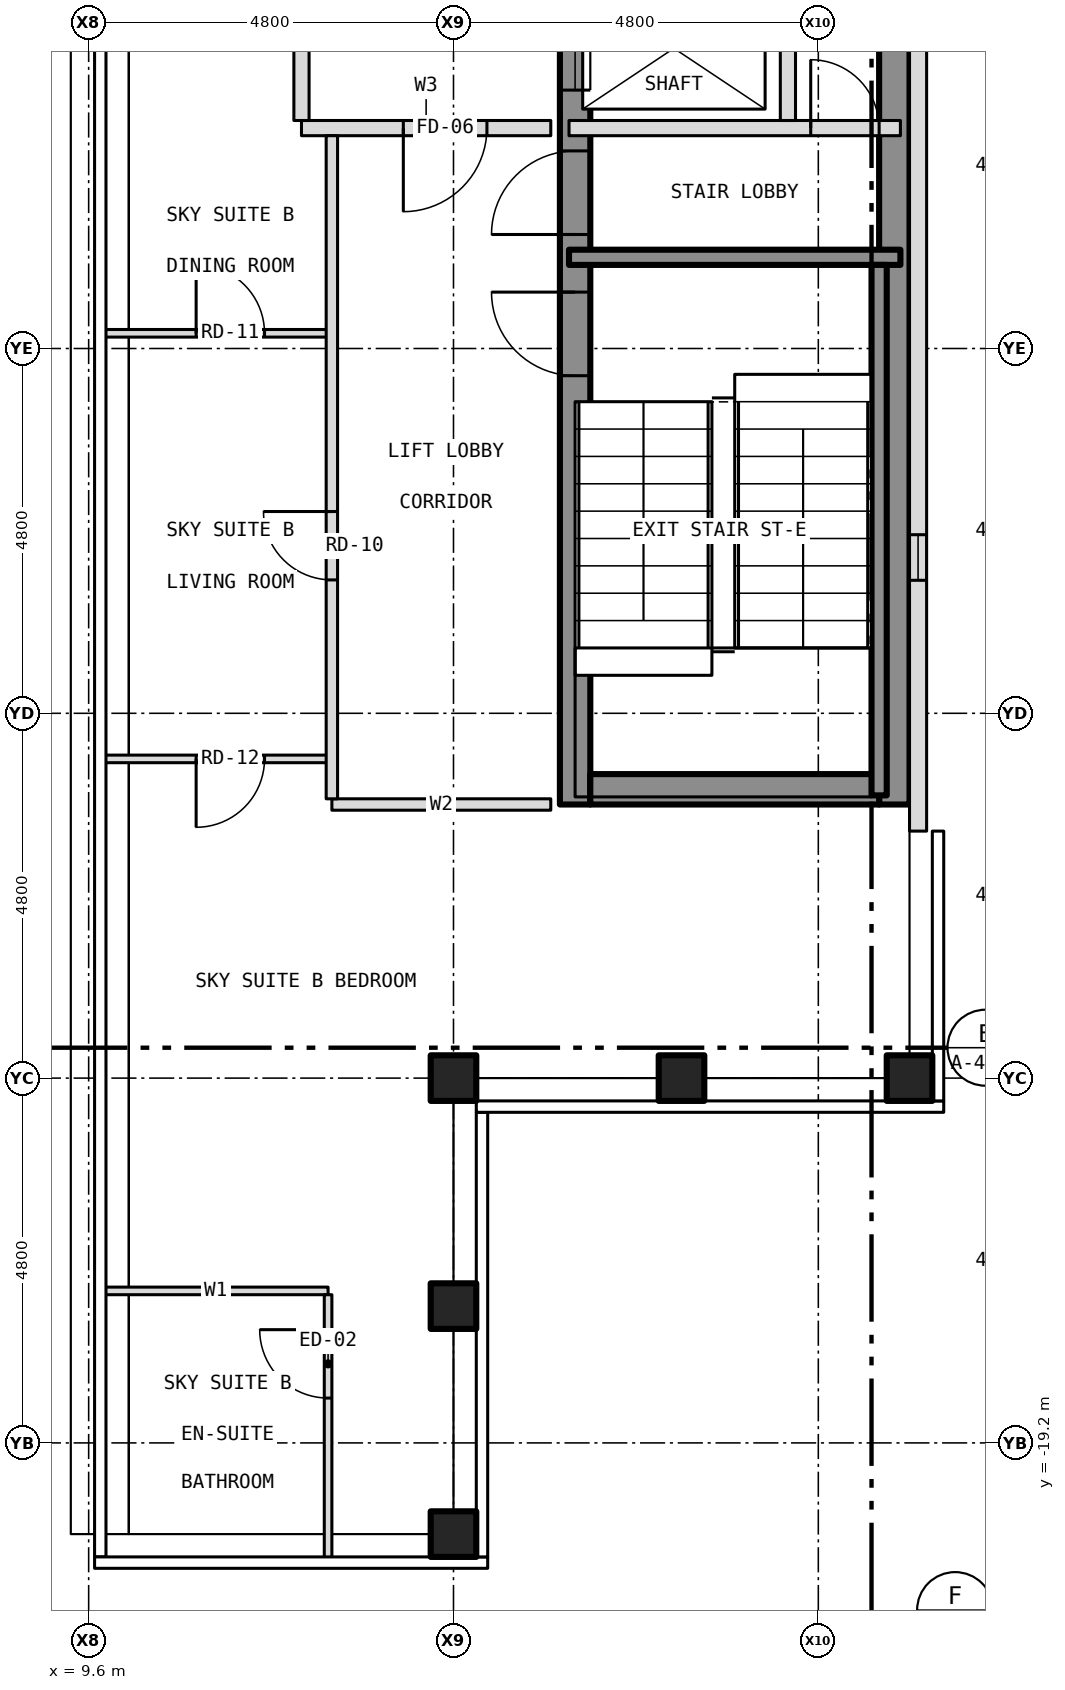
"""IFC4 building model, lengths in metres.
Left out: names, types, materials, properties, quantities, classifications, styles, units other than length and angle.
Written with IfcOpenShell. Run it as: python <this file> out.ifc"""

import sys

from ifc_helpers import new_model, si_unit, direction, frame, frame_2d, origin, origin_2d, place, context, subcontext, project, spatial, rectangle, hollow_rectangle, extrude, element, fill, save


model = new_model("IFC4")
c1 = context("Model", 3, precision=1e-05, world=origin(), true_north=direction((0.0, 1.0)))
c2 = subcontext(c1, "Body", "Model", "MODEL_VIEW")
j1 = project(units=[si_unit("LENGTHUNIT", "METRE"), si_unit("PLANEANGLEUNIT", "RADIAN")], contexts=[c1])
p1 = place(None, origin())
s1 = spatial("IfcSite", under=j1, at=p1, CompositionType="ELEMENT")
p2 = place(p1, origin())
s2 = spatial("IfcBuilding", under=s1, at=p2, CompositionType="ELEMENT")
p3 = place(p2, frame((0.0, 0.0, 279.5)))
s3 = spatial("IfcBuildingStorey", under=s2, at=p3, CompositionType="ELEMENT", Elevation=279.5)
for number, where, z_axis, x_axis in (
    (1, (14.4, -20.4, -0.15), (0.0, 0.0, 1.0), (1.0, 0.0, 0.0)),
    (2, (20.4, -14.4, -0.15), (0.0, 0.0, 1.0), (1.0, 0.0, 0.0)),
    (3, (14.4, -14.4, -0.15), (0.0, 0.0, 1.0), (1.0, 0.0, 0.0)),
    (4, (14.4, -17.4, -0.15), (0.0, 0.0, 1.0), (1.0, 0.0, 0.0)),
    (5, (17.4, -14.4, -0.15), (0.0, 0.0, 1.0), (1.0, 0.0, 0.0)),
):
    element("IfcColumn", number, at=place(p3, frame(where, z_axis=z_axis, x_axis=x_axis)), inside=s3, PredefinedType="COLUMN", context=c2, shape_type="SweptSolid", body=[
        extrude(hollow_rectangle(XDim=0.6, YDim=0.6, WallThickness=0.03, at=origin_2d()), origin(), (0.0, 0.0, 1.0), 3.5),
    ])
p4 = place(p3, frame((16.0, -10.8, 0.0), z_axis=(0.0, 0.0, 1.0), x_axis=(0.0, 1.0, 0.0)))
e6 = element("IfcWall", 6, at=p4, inside=s3, PredefinedType="SHEAR", context=c2, shape_type="SweptSolid", body=[
    extrude(rectangle(XDim=21.6, YDim=0.4, at=frame_2d((10.8, 0.0))), origin(), (0.0, 0.0, 1.0), 3.25),
])
p5 = place(p4, frame((9.4, 0.0, 0.0)))
e7 = element("IfcOpeningElement", 7, at=p5, cuts=e6, PredefinedType="OPENING", context=c2, shape_type="SweptSolid", body=[
    extrude(rectangle(XDim=1.1, YDim=2.1, at=frame_2d((0.55, 1.05))), frame((0.0, 0.212, 0.0), z_axis=(0.0, -1.0, 0.0), x_axis=(1.0, 0.0, 0.0)), (0.0, 0.0, 1.0), 0.424),
])
p6 = place(p4, frame((11.5, 0.0, 0.0)))
e8 = element("IfcOpeningElement", 8, at=p6, cuts=e6, PredefinedType="OPENING", context=c2, shape_type="SweptSolid", body=[
    extrude(rectangle(XDim=1.1, YDim=2.1, at=frame_2d((0.55, 1.05))), frame((0.0, 0.212, 0.0), z_axis=(0.0, -1.0, 0.0), x_axis=(1.0, 0.0, 0.0)), (0.0, 0.0, 1.0), 0.424),
])
p7 = place(p4, frame((13.6, 0.0, 0.0)))
e9 = element("IfcOpeningElement", 9, at=p7, cuts=e6, PredefinedType="OPENING", context=c2, shape_type="SweptSolid", body=[
    extrude(rectangle(XDim=1.1, YDim=2.1, at=frame_2d((0.55, 1.05))), frame((0.0, 0.212, 0.0), z_axis=(0.0, -1.0, 0.0), x_axis=(1.0, 0.0, 0.0)), (0.0, 0.0, 1.0), 0.424),
])
p8 = place(p4, frame((15.7, 0.0, 0.0)))
e10 = element("IfcOpeningElement", 10, at=p8, cuts=e6, PredefinedType="OPENING", context=c2, shape_type="SweptSolid", body=[
    extrude(rectangle(XDim=1.1, YDim=2.1, at=frame_2d((0.55, 1.05))), frame((0.0, 0.212, 0.0), z_axis=(0.0, -1.0, 0.0), x_axis=(1.0, 0.0, 0.0)), (0.0, 0.0, 1.0), 0.424),
])
p9 = place(p4, frame((17.8, 0.0, 0.0)))
e11 = element("IfcOpeningElement", 11, at=p9, cuts=e6, PredefinedType="OPENING", context=c2, shape_type="SweptSolid", body=[
    extrude(rectangle(XDim=1.1, YDim=2.1, at=frame_2d((0.55, 1.05))), frame((0.0, 0.212, 0.0), z_axis=(0.0, -1.0, 0.0), x_axis=(1.0, 0.0, 0.0)), (0.0, 0.0, 1.0), 0.424),
])
p10 = place(p4, frame((5.642, 0.0, 0.0)))
e12 = element("IfcOpeningElement", 12, at=p10, cuts=e6, PredefinedType="OPENING", context=c2, shape_type="SweptSolid", body=[
    extrude(rectangle(XDim=1.1, YDim=2.1, at=frame_2d((0.55, 1.05))), frame((0.0, 0.212, 0.0), z_axis=(0.0, -1.0, 0.0), x_axis=(1.0, 0.0, 0.0)), (0.0, 0.0, 1.0), 0.424),
])
p11 = place(p4, frame((7.5, 0.0, 0.0)))
e13 = element("IfcOpeningElement", 13, at=p11, cuts=e6, PredefinedType="OPENING", context=c2, shape_type="SweptSolid", body=[
    extrude(rectangle(XDim=1.1, YDim=2.1, at=frame_2d((0.55, 1.05))), frame((0.0, 0.212, 0.0), z_axis=(0.0, -1.0, 0.0), x_axis=(1.0, 0.0, 0.0)), (0.0, 0.0, 1.0), 0.424),
])
p12 = place(p4, frame((20.0, 0.0, 0.0)))
e14 = element("IfcOpeningElement", 14, at=p12, cuts=e6, PredefinedType="OPENING", context=c2, shape_type="SweptSolid", body=[
    extrude(rectangle(XDim=0.9, YDim=2.1, at=frame_2d((0.45, 1.05))), frame((0.0, 0.212, 0.0), z_axis=(0.0, -1.0, 0.0), x_axis=(1.0, 0.0, 0.0)), (0.0, 0.0, 1.0), 0.424),
])
p13 = place(p3, frame((20.2, -10.8, 0.0), z_axis=(0.0, 0.0, 1.0), x_axis=(0.0, 1.0, 0.0)))
e15 = element("IfcWall", 15, at=p13, inside=s3, PredefinedType="SHEAR", context=c2, shape_type="SweptSolid", body=[
    extrude(rectangle(XDim=21.6, YDim=0.4, at=frame_2d((10.8, 0.0))), origin(), (0.0, 0.0, 1.0), 3.25),
])
p14 = place(p3, frame((16.2, -10.6, 0.0), z_axis=(0.0, 0.0, 1.0), x_axis=(1.0, 0.0, 0.0)))
e16 = element("IfcWall", 16, at=p14, inside=s3, PredefinedType="SHEAR", context=c2, shape_type="SweptSolid", body=[
    extrude(rectangle(XDim=3.8, YDim=0.4, at=frame_2d((1.9, 0.0))), origin(), (0.0, 0.0, 1.0), 3.25),
])
p15 = place(p3, frame((20.512, -11.15, 0.0), z_axis=(0.0, 0.0, 1.0), x_axis=(0.0, 1.0, 0.0)))
e17 = element("IfcWall", 17, at=p15, inside=s3, PredefinedType="SOLIDWALL", context=c2, shape_type="SweptSolid", body=[
    extrude(rectangle(XDim=22.3, YDim=0.225, at=frame_2d((11.15, 0.0))), origin(), (0.0, 0.0, 1.0), 3.5),
])
p16 = place(p15, frame((3.3, 0.0, 1.0)))
e18 = element("IfcOpeningElement", 18, at=p16, cuts=e17, PredefinedType="OPENING", context=c2, shape_type="SweptSolid", body=[
    extrude(rectangle(XDim=0.6, YDim=1.5, at=frame_2d((0.3, 0.75))), frame((0.0, 0.125, 0.0), z_axis=(0.0, -1.0, 0.0), x_axis=(1.0, 0.0, 0.0)), (0.0, 0.0, 1.0), 0.249),
])
p17 = place(p3, frame((9.798, -17.2, 0.0), z_axis=(0.0, 0.0, 1.0), x_axis=(1.0, 0.0, 0.0)))
e19 = element("IfcWall", 19, at=p17, inside=s3, PredefinedType="PARTITIONING", context=c2, shape_type="SweptSolid", body=[
    extrude(rectangle(XDim=2.952, YDim=0.1, at=frame_2d((1.476, 0.0))), origin(), (0.0, 0.0, 1.0), 3.35),
])
p18 = place(p3, frame((12.8, -10.8, 0.0), z_axis=(0.0, 0.0, 1.0), x_axis=(1.0, 0.0, 0.0)))
e20 = element("IfcWall", 20, at=p18, inside=s3, PredefinedType="PARTITIONING", context=c2, shape_type="SweptSolid", body=[
    extrude(rectangle(XDim=2.88, YDim=0.15, at=frame_2d((1.44, 0.0))), origin(), (0.0, 0.0, 1.0), 3.35),
])
p19 = place(p3, frame((9.798, -10.2, 0.0), z_axis=(0.0, 0.0, 1.0), x_axis=(1.0, 0.0, 0.0)))
e21 = element("IfcWall", 21, at=p19, inside=s3, PredefinedType="PARTITIONING", context=c2, shape_type="SweptSolid", body=[
    extrude(rectangle(XDim=3.002, YDim=0.1, at=frame_2d((1.501, 0.0))), origin(), (0.0, 0.0, 1.0), 3.35),
])
p20 = place(p19, frame((1.216, 0.0, 0.0)))
e22 = element("IfcOpeningElement", 22, at=p20, cuts=e21, PredefinedType="OPENING", context=c2, shape_type="SweptSolid", body=[
    extrude(rectangle(XDim=0.9, YDim=2.1, at=frame_2d((0.45, 1.05))), frame((0.0, 0.062, 0.0), z_axis=(0.0, -1.0, 0.0), x_axis=(1.0, 0.0, 0.0)), (0.0, 0.0, 1.0), 0.124),
])
p21 = place(p3, frame((9.798, -4.6, 0.0), z_axis=(0.0, 0.0, 1.0), x_axis=(1.0, 0.0, 0.0)))
e23 = element("IfcWall", 23, at=p21, inside=s3, PredefinedType="PARTITIONING", context=c2, shape_type="SweptSolid", body=[
    extrude(rectangle(XDim=3.002, YDim=0.1, at=frame_2d((1.501, 0.0))), origin(), (0.0, 0.0, 1.0), 3.35),
])
p22 = place(p21, frame((1.216, 0.0, 0.0)))
e24 = element("IfcOpeningElement", 24, at=p22, cuts=e23, PredefinedType="OPENING", context=c2, shape_type="SweptSolid", body=[
    extrude(rectangle(XDim=0.9, YDim=2.1, at=frame_2d((0.45, 1.05))), frame((0.0, 0.062, 0.0), z_axis=(0.0, -1.0, 0.0), x_axis=(1.0, 0.0, 0.0)), (0.0, 0.0, 1.0), 0.124),
])
p23 = place(p3, frame((15.92, -3.6, 0.0), z_axis=(0.0, 0.0, 1.0), x_axis=(1.0, 0.0, 0.0)))
e25 = element("IfcWall", 25, at=p23, inside=s3, PredefinedType="SHEAR", context=c2, shape_type="SweptSolid", body=[
    extrude(rectangle(XDim=4.36, YDim=0.2, at=frame_2d((2.18, 0.0))), origin(), (0.0, 0.0, 1.0), 3.25),
])
p24 = place(p3, frame((12.4, -1.9, 0.0), z_axis=(0.0, 0.0, 1.0), x_axis=(1.0, 0.0, 0.0)))
e26 = element("IfcWall", 26, at=p24, inside=s3, PredefinedType="PARTITIONING", context=c2, shape_type="SweptSolid", body=[
    extrude(rectangle(XDim=3.28, YDim=0.2, at=frame_2d((1.64, 0.0))), origin(), (0.0, 0.0, 1.0), 3.35),
])
p25 = place(p24, frame((1.34, 0.0, 0.0)))
e27 = element("IfcOpeningElement", 27, at=p25, cuts=e26, PredefinedType="OPENING", context=c2, shape_type="SweptSolid", body=[
    extrude(rectangle(XDim=1.1, YDim=2.1, at=frame_2d((0.55, 1.05))), frame((0.0, 0.112, 0.0), z_axis=(0.0, -1.0, 0.0), x_axis=(1.0, 0.0, 0.0)), (0.0, 0.0, 1.0), 0.224),
])
p26 = place(p3, frame((15.92, -1.9, 0.0), z_axis=(0.0, 0.0, 1.0), x_axis=(1.0, 0.0, 0.0)))
e28 = element("IfcWall", 28, at=p26, inside=s3, PredefinedType="PARTITIONING", context=c2, shape_type="SweptSolid", body=[
    extrude(rectangle(XDim=4.36, YDim=0.2, at=frame_2d((2.18, 0.0))), origin(), (0.0, 0.0, 1.0), 3.25),
])
p27 = place(p26, frame((3.18, 0.0, 0.0)))
e29 = element("IfcOpeningElement", 29, at=p27, cuts=e28, PredefinedType="OPENING", context=c2, shape_type="SweptSolid", body=[
    extrude(rectangle(XDim=0.9, YDim=2.1, at=frame_2d((0.45, 1.05))), frame((0.0, 0.112, 0.0), z_axis=(0.0, -1.0, 0.0), x_axis=(1.0, 0.0, 0.0)), (0.0, 0.0, 1.0), 0.224),
])
p28 = place(p3, frame((12.4, -1.8, 0.0), z_axis=(0.0, 0.0, 1.0), x_axis=(0.0, 1.0, 0.0)))
e30 = element("IfcWall", 30, at=p28, inside=s3, PredefinedType="PARTITIONING", context=c2, shape_type="SweptSolid", body=[
    extrude(rectangle(XDim=4.0, YDim=0.2, at=frame_2d((2.0, 0.0))), origin(), (0.0, 0.0, 1.0), 3.35),
])
p29 = place(p3, frame((12.75, -20.73, 0.0), z_axis=(0.0, 0.0, 1.0), x_axis=(0.0, 1.0, 0.0)))
e31 = element("IfcWall", 31, at=p29, inside=s3, PredefinedType="PARTITIONING", context=c2, shape_type="SweptSolid", body=[
    extrude(rectangle(XDim=3.48, YDim=0.1, at=frame_2d((1.74, 0.0))), origin(), (0.0, 0.0, 1.0), 3.35),
])
p30 = place(p29, frame((2.12, 0.0, 0.0)))
e32 = element("IfcOpeningElement", 32, at=p30, cuts=e31, PredefinedType="OPENING", context=c2, shape_type="SweptSolid", body=[
    extrude(rectangle(XDim=0.9, YDim=2.1, at=frame_2d((0.45, 1.05))), frame((0.0, 0.062, 0.0), z_axis=(0.0, -1.0, 0.0), x_axis=(1.0, 0.0, 0.0)), (0.0, 0.0, 1.0), 0.124),
])
p31 = place(p3, frame((12.8, -10.725, 0.0), z_axis=(0.0, 0.0, 1.0), x_axis=(0.0, 1.0, 0.0)))
e33 = element("IfcWall", 33, at=p31, inside=s3, PredefinedType="PARTITIONING", context=c2, shape_type="SweptSolid", body=[
    extrude(rectangle(XDim=8.725, YDim=0.15, at=frame_2d((4.363, 0.0))), origin(), (0.0, 0.0, 1.0), 3.35),
])
p32 = place(p31, frame((2.88, 0.0, 0.0)))
e34 = element("IfcOpeningElement", 34, at=p32, cuts=e33, PredefinedType="OPENING", context=c2, shape_type="SweptSolid", body=[
    extrude(rectangle(XDim=0.9, YDim=2.1, at=frame_2d((0.45, 1.05))), frame((0.0, 0.087, 0.0), z_axis=(0.0, -1.0, 0.0), x_axis=(1.0, 0.0, 0.0)), (0.0, 0.0, 1.0), 0.174),
])
p33 = place(p3, frame((18.8, -1.8, 0.0), z_axis=(0.0, 0.0, 1.0), x_axis=(0.0, 1.0, 0.0)))
e35 = element("IfcWall", 35, at=p33, inside=s3, PredefinedType="PARTITIONING", context=c2, shape_type="SweptSolid", body=[
    extrude(rectangle(XDim=6.1, YDim=0.2, at=frame_2d((3.05, 0.0))), origin(), (0.0, 0.0, 1.0), 3.25),
])
p34 = place(p3, frame((20.0, -10.68, 0.0), z_axis=(0.0, 0.0, 1.0), x_axis=(0.0, 1.0, 0.0)))
e36 = element("IfcWall", 36, at=p34, inside=s3, PredefinedType="SHEAR", context=c2, shape_type="SweptSolid", body=[
    extrude(rectangle(XDim=6.98, YDim=0.2, at=frame_2d((3.49, 0.0))), origin(), (0.0, 0.0, 1.0), 3.25),
])
p35 = place(p16, origin())
e37 = element("IfcWindow", 37, at=p35, inside=s3, PartitioningType="SINGLE_PANEL", PredefinedType="WINDOW", context=c2, shape_type="SweptSolid", body=[
    extrude(rectangle(XDim=0.6, YDim=1.5, at=frame_2d((0.3, 0.75))), frame((0.0, -0.022, 0.0), z_axis=(0.0, -1.0, 0.0), x_axis=(1.0, 0.0, 0.0)), (0.0, 0.0, 1.0), 0.06),
])
fill(e18, e37)
p36 = place(p5, origin())
e38 = element("IfcDoor", 38, at=p36, inside=s3, OperationType="SLIDING_TO_LEFT", PredefinedType="DOOR", context=c2, shape_type="SweptSolid", body=[
    extrude(rectangle(XDim=1.1, YDim=2.1, at=frame_2d((0.55, 1.05))), frame((0.0, 0.025, 0.0), z_axis=(0.0, -1.0, 0.0), x_axis=(1.0, 0.0, 0.0)), (0.0, 0.0, 1.0), 0.05),
])
fill(e7, e38)
p37 = place(p10, origin())
e39 = element("IfcDoor", 39, at=p37, inside=s3, OperationType="SINGLE_SWING_RIGHT", PredefinedType="DOOR", context=c2, shape_type="SweptSolid", body=[
    extrude(rectangle(XDim=1.1, YDim=2.1, at=frame_2d((0.55, 1.05))), frame((0.0, 0.025, 0.0), z_axis=(0.0, -1.0, 0.0), x_axis=(1.0, 0.0, 0.0)), (0.0, 0.0, 1.0), 0.05),
])
fill(e12, e39)
p38 = place(p11, origin())
e40 = element("IfcDoor", 40, at=p38, inside=s3, OperationType="SINGLE_SWING_LEFT", PredefinedType="DOOR", context=c2, shape_type="SweptSolid", body=[
    extrude(rectangle(XDim=1.1, YDim=2.1, at=frame_2d((0.55, 1.05))), frame((0.0, 0.025, 0.0), z_axis=(0.0, -1.0, 0.0), x_axis=(1.0, 0.0, 0.0)), (0.0, 0.0, 1.0), 0.05),
])
fill(e13, e40)
p39 = place(p27, origin())
e41 = element("IfcDoor", 41, at=p39, inside=s3, OperationType="SINGLE_SWING_LEFT", PredefinedType="DOOR", context=c2, shape_type="SweptSolid", body=[
    extrude(rectangle(XDim=0.9, YDim=2.1, at=frame_2d((0.45, 1.05))), frame((0.0, 0.025, 0.0), z_axis=(0.0, -1.0, 0.0), x_axis=(1.0, 0.0, 0.0)), (0.0, 0.0, 1.0), 0.05),
])
fill(e29, e41)
p40 = place(p25, origin())
e42 = element("IfcDoor", 42, at=p40, inside=s3, OperationType="SINGLE_SWING_LEFT", PredefinedType="DOOR", context=c2, shape_type="SweptSolid", body=[
    extrude(rectangle(XDim=1.1, YDim=2.1, at=frame_2d((0.55, 1.05))), frame((0.0, 0.025, 0.0), z_axis=(0.0, -1.0, 0.0), x_axis=(1.0, 0.0, 0.0)), (0.0, 0.0, 1.0), 0.05),
])
fill(e27, e42)
p41 = place(p32, origin())
e43 = element("IfcDoor", 43, at=p41, inside=s3, OperationType="SINGLE_SWING_RIGHT", PredefinedType="DOOR", context=c2, shape_type="SweptSolid", body=[
    extrude(rectangle(XDim=0.9, YDim=2.1, at=frame_2d((0.45, 1.05))), frame((0.0, 0.025, 0.0), z_axis=(0.0, -1.0, 0.0), x_axis=(1.0, 0.0, 0.0)), (0.0, 0.0, 1.0), 0.05),
])
fill(e34, e43)
p42 = place(p22, origin())
e44 = element("IfcDoor", 44, at=p42, inside=s3, OperationType="SINGLE_SWING_LEFT", PredefinedType="DOOR", context=c2, shape_type="SweptSolid", body=[
    extrude(rectangle(XDim=0.9, YDim=2.1, at=frame_2d((0.45, 1.05))), frame((0.0, 0.025, 0.0), z_axis=(0.0, -1.0, 0.0), x_axis=(1.0, 0.0, 0.0)), (0.0, 0.0, 1.0), 0.05),
])
fill(e24, e44)
p43 = place(p20, origin())
e45 = element("IfcDoor", 45, at=p43, inside=s3, OperationType="SINGLE_SWING_LEFT", PredefinedType="DOOR", context=c2, shape_type="SweptSolid", body=[
    extrude(rectangle(XDim=0.9, YDim=2.1, at=frame_2d((0.45, 1.05))), frame((0.0, 0.025, 0.0), z_axis=(0.0, -1.0, 0.0), x_axis=(1.0, 0.0, 0.0)), (0.0, 0.0, 1.0), 0.05),
])
fill(e22, e45)
p44 = place(p30, origin())
e46 = element("IfcDoor", 46, at=p44, inside=s3, OperationType="SINGLE_SWING_RIGHT", PredefinedType="DOOR", context=c2, shape_type="SweptSolid", body=[
    extrude(rectangle(XDim=0.9, YDim=2.1, at=frame_2d((0.45, 1.05))), frame((0.0, 0.025, 0.0), z_axis=(0.0, -1.0, 0.0), x_axis=(1.0, 0.0, 0.0)), (0.0, 0.0, 1.0), 0.05),
])
fill(e32, e46)
save(model, sys.argv[1])
